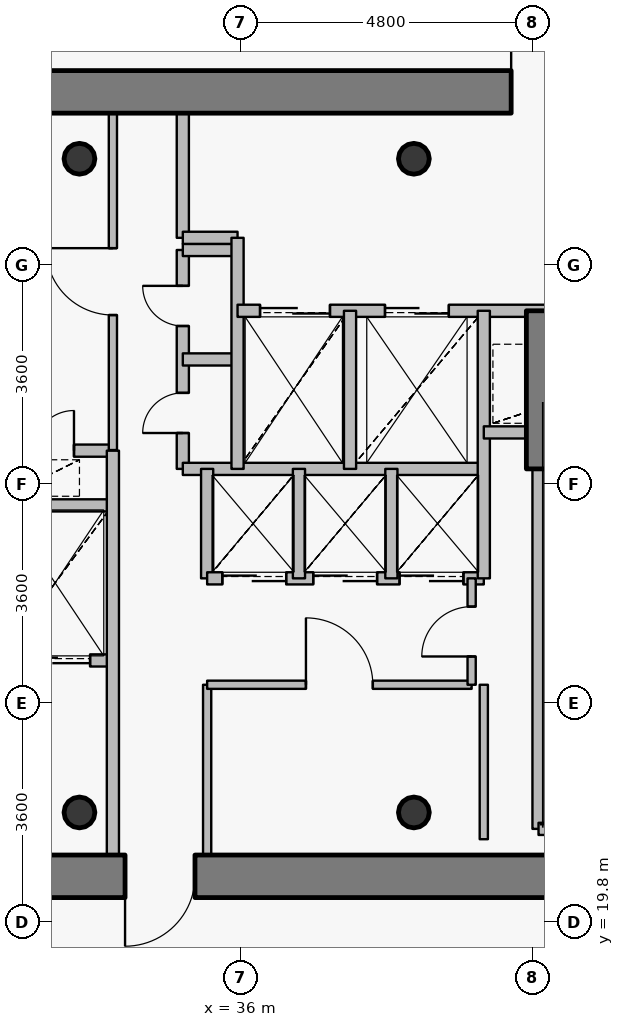
"""IFC4 building model, lengths in metres.
Left out: names, types, materials, properties, quantities, classifications, styles, units other than length and angle.
Written with IfcOpenShell. Run it as: python <this file> out.ifc"""

import sys

from ifc_helpers import new_model, si_unit, direction, frame, frame_2d, origin, origin_2d, place, context, subcontext, project, spatial, rectangle, hollow_circle, extrude, source, transform, mapped, element, fill, save


model = new_model("IFC4")
c1 = context("Model", 3, precision=1e-05, world=origin(), true_north=direction((0.0, 1.0)))
c2 = subcontext(c1, "Body", "Model", "MODEL_VIEW")
j1 = project(units=[si_unit("LENGTHUNIT", "METRE"), si_unit("PLANEANGLEUNIT", "RADIAN")], contexts=[c1])
p1 = place(None, origin())
s1 = spatial("IfcSite", under=j1, at=p1, CompositionType="ELEMENT")
p2 = place(p1, origin())
s2 = spatial("IfcBuilding", under=s1, at=p2, CompositionType="ELEMENT")
p3 = place(p2, frame((0.0, 0.0, 343.0)))
s3 = spatial("IfcBuildingStorey", under=s2, at=p3, CompositionType="ELEMENT", Elevation=343.0)
for number, where, z_axis, x_axis in (
    (1, (33.35, 21.6, 0.0), (0.0, 0.0, 1.0), (1.0, 0.0, 0.0)),
    (2, (38.85, 21.6, 0.0), (0.0, 0.0, 1.0), (1.0, 0.0, 0.0)),
    (3, (38.85, 32.35, 0.0), (0.0, 0.0, 1.0), (1.0, 0.0, 0.0)),
    (4, (33.35, 32.35, 0.0), (0.0, 0.0, 1.0), (1.0, 0.0, 0.0)),
):
    element("IfcColumn", number, at=place(p3, frame(where, z_axis=z_axis, x_axis=x_axis)), inside=s3, PredefinedType="COLUMN", context=c2, shape_type="SweptSolid", body=[
        extrude(hollow_circle(Radius=0.254, WallThickness=0.02, at=origin_2d()), origin(), (0.0, 0.0, 1.0), 3.8),
    ])
p4 = place(p3, frame((27.6, 33.45, 0.0), z_axis=(0.0, 0.0, 1.0), x_axis=(1.0, 0.0, 0.0)))
e5 = element("IfcWall", 5, at=p4, inside=s3, PredefinedType="SHEAR", context=c2, shape_type="SweptSolid", body=[
    extrude(rectangle(XDim=16.8, YDim=0.7, at=frame_2d((8.4, 0.0))), origin(), (0.0, 0.0, 1.0), 3.05),
])
p5 = place(p4, frame((12.85, 0.0, 0.0)))
e6 = element("IfcOpeningElement", 6, at=p5, cuts=e5, PredefinedType="OPENING", context=c2, shape_type="SweptSolid", body=[
    extrude(rectangle(XDim=1.15, YDim=2.15, at=origin_2d()), frame((0.575, 0.36, 1.075), z_axis=(0.0, -1.0, 0.0), x_axis=(1.0, 0.0, 0.0)), (0.0, 0.0, 1.0), 0.72),
])
p6 = place(p3, frame((44.4, 20.55, 0.0), z_axis=(0.0, 0.0, 1.0), x_axis=(-1.0, 0.0, 0.0)))
e7 = element("IfcWall", 7, at=p6, inside=s3, PredefinedType="SHEAR", context=c2, shape_type="SweptSolid", body=[
    extrude(rectangle(XDim=16.8, YDim=0.7, at=frame_2d((8.4, 0.0))), origin(), (0.0, 0.0, 1.0), 3.05),
])
p7 = place(p6, frame((13.0, 0.0, 0.0)))
e8 = element("IfcOpeningElement", 8, at=p7, cuts=e7, PredefinedType="OPENING", context=c2, shape_type="SweptSolid", body=[
    extrude(rectangle(XDim=1.15, YDim=2.15, at=origin_2d()), frame((0.575, 0.36, 1.075), z_axis=(0.0, -1.0, 0.0), x_axis=(1.0, 0.0, 0.0)), (0.0, 0.0, 1.0), 0.72),
])
p8 = place(p6, frame((9.15, 0.0, 0.0)))
e9 = element("IfcOpeningElement", 9, at=p8, cuts=e7, PredefinedType="OPENING", context=c2, shape_type="SweptSolid", body=[
    extrude(rectangle(XDim=1.15, YDim=2.15, at=origin_2d()), frame((0.575, 0.36, 1.075), z_axis=(0.0, -1.0, 0.0), x_axis=(1.0, 0.0, 0.0)), (0.0, 0.0, 1.0), 0.72),
])
p9 = place(p3, frame((40.9, 27.25, 0.0), z_axis=(0.0, 0.0, 1.0), x_axis=(0.0, 1.0, 0.0)))
e10 = element("IfcWall", 10, at=p9, inside=s3, PredefinedType="SHEAR", context=c2, shape_type="SweptSolid", body=[
    extrude(rectangle(XDim=2.6, YDim=0.4, at=frame_2d((1.3, 0.0))), origin(), (0.0, 0.0, 1.0), 3.1),
])
p10 = place(p3, frame((31.1, 27.55, 0.0), z_axis=(0.0, 0.0, 1.0), x_axis=(1.0, 0.0, 0.0)))
e11 = element("IfcWall", 11, at=p10, inside=s3, PredefinedType="PARTITIONING", context=c2, shape_type="SweptSolid", body=[
    extrude(rectangle(XDim=2.8, YDim=0.2, at=frame_2d((1.4, 0.0))), origin(), (0.0, 0.0, 1.0), 3.085),
])
p11 = place(p10, frame((1.5, 0.0, 0.0)))
e12 = element("IfcOpeningElement", 12, at=p11, cuts=e11, PredefinedType="OPENING", context=c2, shape_type="SweptSolid", body=[
    extrude(rectangle(XDim=0.66, YDim=2.05, at=origin_2d()), frame((0.33, 0.11, 1.025), z_axis=(0.0, -1.0, 0.0), x_axis=(1.0, 0.0, 0.0)), (0.0, 0.0, 1.0), 0.22),
])
p12 = place(p3, frame((32.0, 24.1, 0.0), z_axis=(0.0, 0.0, 1.0), x_axis=(1.0, 0.0, 0.0)))
e13 = element("IfcWall", 13, at=p12, inside=s3, PredefinedType="PARTITIONING", context=c2, shape_type="SweptSolid", body=[
    extrude(rectangle(XDim=1.9, YDim=0.2, at=frame_2d((0.95, 0.0))), origin(), (0.0, 0.0, 1.0), 3.085),
])
p13 = place(p12, frame((0.375, 0.0, 0.0)))
e14 = element("IfcOpeningElement", 14, at=p13, cuts=e13, PredefinedType="OPENING", context=c2, shape_type="SweptSolid", body=[
    extrude(rectangle(XDim=1.15, YDim=2.15, at=origin_2d()), frame((0.575, 0.11, 1.075), z_axis=(0.0, -1.0, 0.0), x_axis=(1.0, 0.0, 0.0)), (0.0, 0.0, 1.0), 0.22),
])
p14 = place(p3, frame((32.0, 26.65, 0.0), z_axis=(0.0, 0.0, 1.0), x_axis=(1.0, 0.0, 0.0)))
e15 = element("IfcWall", 15, at=p14, inside=s3, PredefinedType="PARTITIONING", context=c2, shape_type="SweptSolid", body=[
    extrude(rectangle(XDim=1.9, YDim=0.2, at=frame_2d((0.95, 0.0))), origin(), (0.0, 0.0, 1.0), 3.085),
])
p15 = place(p3, frame((33.9, 20.9, 0.0), z_axis=(0.0, 0.0, 1.0), x_axis=(0.0, 1.0, 0.0)))
e16 = element("IfcWall", 16, at=p15, inside=s3, PredefinedType="PARTITIONING", context=c2, shape_type="SweptSolid", body=[
    extrude(rectangle(XDim=6.65, YDim=0.2, at=frame_2d((3.325, 0.0))), origin(), (0.0, 0.0, 1.0), 3.085),
])
p16 = place(p3, frame((33.9, 27.56, 0.0), z_axis=(0.0, 0.0, 1.0), x_axis=(0.0, 1.0, 0.0)))
e17 = element("IfcWall", 17, at=p16, inside=s3, PredefinedType="PARTITIONING", context=c2, shape_type="SweptSolid", body=[
    extrude(rectangle(XDim=5.54, YDim=0.135, at=frame_2d((2.77, 0.0))), origin(), (0.0, 0.0, 1.0), 3.085),
])
p17 = place(p16, frame((2.22, 0.0, 0.0)))
e18 = element("IfcOpeningElement", 18, at=p17, cuts=e17, PredefinedType="OPENING", context=c2, shape_type="SweptSolid", body=[
    extrude(rectangle(XDim=1.1, YDim=2.15, at=origin_2d()), frame((0.55, 0.078, 1.075), z_axis=(0.0, -1.0, 0.0), x_axis=(1.0, 0.0, 0.0)), (0.0, 0.0, 1.0), 0.155),
])
p18 = place(p3, frame((35.05, 27.25, 0.0), z_axis=(0.0, 0.0, 1.0), x_axis=(0.0, 1.0, 0.0)))
e19 = element("IfcWall", 19, at=p18, inside=s3, PredefinedType="PARTITIONING", context=c2, shape_type="SweptSolid", body=[
    extrude(rectangle(XDim=3.6, YDim=0.2, at=frame_2d((1.8, 0.0))), origin(), (0.0, 0.0, 1.0), 3.5),
])
p19 = place(p18, frame((0.59, 0.0, 0.0)))
e20 = element("IfcOpeningElement", 20, at=p19, cuts=e19, PredefinedType="OPENING", context=c2, shape_type="SweptSolid", body=[
    extrude(rectangle(XDim=0.66, YDim=2.05, at=origin_2d()), frame((0.33, 0.11, 1.025), z_axis=(0.0, -1.0, 0.0), x_axis=(1.0, 0.0, 0.0)), (0.0, 0.0, 1.0), 0.22),
])
p20 = place(p18, frame((2.35, 0.0, 0.0)))
e21 = element("IfcOpeningElement", 21, at=p20, cuts=e19, PredefinedType="OPENING", context=c2, shape_type="SweptSolid", body=[
    extrude(rectangle(XDim=0.66, YDim=2.05, at=origin_2d()), frame((0.33, 0.11, 1.025), z_axis=(0.0, -1.0, 0.0), x_axis=(1.0, 0.0, 0.0)), (0.0, 0.0, 1.0), 0.22),
])
p21 = place(p3, frame((35.05, 27.25, 0.0), z_axis=(0.0, 0.0, 1.0), x_axis=(1.0, 0.0, 0.0)))
e22 = element("IfcWall", 22, at=p21, inside=s3, PredefinedType="PARTITIONING", context=c2, shape_type="SweptSolid", body=[
    extrude(rectangle(XDim=4.95, YDim=0.2, at=frame_2d((2.475, 0.0))), origin(), (0.0, 0.0, 1.0), 3.085),
])
for number, where, z_axis, x_axis in (
    (23, (35.05, 29.05, 0.0), (0.0, 0.0, 1.0), (1.0, 0.0, 0.0)),
    (24, (35.05, 30.85, 0.0), (0.0, 0.0, 1.0), (1.0, 0.0, 0.0)),
):
    element("IfcWall", number, at=place(p3, frame(where, z_axis=z_axis, x_axis=x_axis)), inside=s3, PredefinedType="PARTITIONING", context=c2, shape_type="SweptSolid", body=[
        extrude(rectangle(XDim=0.9, YDim=0.2, at=frame_2d((0.45, 0.0))), origin(), (0.0, 0.0, 1.0), 3.5),
    ])
p22 = place(p3, frame((35.05, 31.05, 0.0), z_axis=(0.0, 0.0, 1.0), x_axis=(0.0, 1.0, 0.0)))
e25 = element("IfcWall", 25, at=p22, inside=s3, PredefinedType="PARTITIONING", context=c2, shape_type="SweptSolid", body=[
    extrude(rectangle(XDim=2.05, YDim=0.2, at=frame_2d((1.025, 0.0))), origin(), (0.0, 0.0, 1.0), 3.085),
])
p23 = place(p3, frame((35.05, 31.05, 0.0), z_axis=(0.0, 0.0, 1.0), x_axis=(1.0, 0.0, 0.0)))
e26 = element("IfcWall", 26, at=p23, inside=s3, PredefinedType="PARTITIONING", context=c2, shape_type="SweptSolid", body=[
    extrude(rectangle(XDim=0.9, YDim=0.2, at=frame_2d((0.45, 0.0))), origin(), (0.0, 0.0, 1.0), 3.5),
])
p24 = place(p3, frame((35.45, 20.9, 0.0), z_axis=(0.0, 0.0, 1.0), x_axis=(0.0, 1.0, 0.0)))
e27 = element("IfcWall", 27, at=p24, inside=s3, PredefinedType="PARTITIONING", context=c2, shape_type="SweptSolid", body=[
    extrude(rectangle(XDim=2.8, YDim=0.135, at=frame_2d((1.4, 0.0))), origin(), (0.0, 0.0, 1.0), 3.085),
])
p25 = place(p3, frame((35.45, 23.7, 0.0), z_axis=(0.0, 0.0, 1.0), x_axis=(1.0, 0.0, 0.0)))
e28 = element("IfcWall", 28, at=p25, inside=s3, PredefinedType="PARTITIONING", context=c2, shape_type="SweptSolid", body=[
    extrude(rectangle(XDim=4.35, YDim=0.135, at=frame_2d((2.175, 0.0))), origin(), (0.0, 0.0, 1.0), 3.085),
])
p26 = place(p25, frame((1.625, 0.0, 0.0)))
e29 = element("IfcOpeningElement", 29, at=p26, cuts=e28, PredefinedType="OPENING", context=c2, shape_type="SweptSolid", body=[
    extrude(rectangle(XDim=1.1, YDim=2.15, at=origin_2d()), frame((0.55, 0.078, 1.075), z_axis=(0.0, -1.0, 0.0), x_axis=(1.0, 0.0, 0.0)), (0.0, 0.0, 1.0), 0.155),
])
p27 = place(p3, frame((35.45, 25.45, 0.0), z_axis=(0.0, 0.0, 1.0), x_axis=(0.0, 1.0, 0.0)))
e30 = element("IfcWall", 30, at=p27, inside=s3, PredefinedType="PARTITIONING", context=c2, shape_type="SweptSolid", body=[
    extrude(rectangle(XDim=1.8, YDim=0.2, at=frame_2d((0.9, 0.0))), origin(), (0.0, 0.0, 1.0), 3.5),
])
p28 = place(p3, frame((35.45, 25.45, 0.0), z_axis=(0.0, 0.0, 1.0), x_axis=(1.0, 0.0, 0.0)))
e31 = element("IfcWall", 31, at=p28, inside=s3, PredefinedType="PARTITIONING", context=c2, shape_type="SweptSolid", body=[
    extrude(rectangle(XDim=4.55, YDim=0.2, at=frame_2d((2.275, 0.0))), origin(), (0.0, 0.0, 1.0), 3.085),
])
p29 = place(p28, frame((0.25, 0.0, 0.0)))
e32 = element("IfcOpeningElement", 32, at=p29, cuts=e31, PredefinedType="OPENING", context=c2, shape_type="SweptSolid", body=[
    extrude(rectangle(XDim=1.05, YDim=2.15, at=origin_2d()), frame((0.525, 0.11, 1.075), z_axis=(0.0, -1.0, 0.0), x_axis=(1.0, 0.0, 0.0)), (0.0, 0.0, 1.0), 0.22),
])
p30 = place(p28, frame((1.745, 0.0, 0.0)))
e33 = element("IfcOpeningElement", 33, at=p30, cuts=e31, PredefinedType="OPENING", context=c2, shape_type="SweptSolid", body=[
    extrude(rectangle(XDim=1.05, YDim=2.15, at=origin_2d()), frame((0.525, 0.11, 1.075), z_axis=(0.0, -1.0, 0.0), x_axis=(1.0, 0.0, 0.0)), (0.0, 0.0, 1.0), 0.22),
])
p31 = place(p28, frame((3.165, 0.0, 0.0)))
e34 = element("IfcOpeningElement", 34, at=p31, cuts=e31, PredefinedType="OPENING", context=c2, shape_type="SweptSolid", body=[
    extrude(rectangle(XDim=1.05, YDim=2.15, at=origin_2d()), frame((0.525, 0.11, 1.075), z_axis=(0.0, -1.0, 0.0), x_axis=(1.0, 0.0, 0.0)), (0.0, 0.0, 1.0), 0.22),
])
p32 = place(p3, frame((35.95, 27.25, 0.0), z_axis=(0.0, 0.0, 1.0), x_axis=(0.0, 1.0, 0.0)))
e35 = element("IfcWall", 35, at=p32, inside=s3, PredefinedType="PARTITIONING", context=c2, shape_type="SweptSolid", body=[
    extrude(rectangle(XDim=3.8, YDim=0.2, at=frame_2d((1.9, 0.0))), origin(), (0.0, 0.0, 1.0), 3.5),
])
p33 = place(p3, frame((35.95, 29.85, 0.0), z_axis=(0.0, 0.0, 1.0), x_axis=(1.0, 0.0, 0.0)))
e36 = element("IfcWall", 36, at=p33, inside=s3, PredefinedType="PARTITIONING", context=c2, shape_type="SweptSolid", body=[
    extrude(rectangle(XDim=8.49, YDim=0.2, at=frame_2d((4.245, 0.0))), origin(), (0.0, 0.0, 1.0), 3.085),
])
p34 = place(p33, frame((6.1, 0.0, 0.0)))
e37 = element("IfcOpeningElement", 37, at=p34, cuts=e36, PredefinedType="OPENING", context=c2, shape_type="SweptSolid", body=[
    extrude(rectangle(XDim=1.2, YDim=2.15, at=origin_2d()), frame((0.6, 0.11, 1.075), z_axis=(0.0, -1.0, 0.0), x_axis=(1.0, 0.0, 0.0)), (0.0, 0.0, 1.0), 0.22),
])
p35 = place(p33, frame((0.37, 0.0, 0.0)))
e38 = element("IfcOpeningElement", 38, at=p35, cuts=e36, PredefinedType="OPENING", context=c2, shape_type="SweptSolid", body=[
    extrude(rectangle(XDim=1.15, YDim=2.15, at=origin_2d()), frame((0.575, 0.11, 1.075), z_axis=(0.0, -1.0, 0.0), x_axis=(1.0, 0.0, 0.0)), (0.0, 0.0, 1.0), 0.22),
])
p36 = place(p33, frame((2.425, 0.0, 0.0)))
e39 = element("IfcOpeningElement", 39, at=p36, cuts=e36, PredefinedType="OPENING", context=c2, shape_type="SweptSolid", body=[
    extrude(rectangle(XDim=1.05, YDim=2.15, at=origin_2d()), frame((0.525, 0.11, 1.075), z_axis=(0.0, -1.0, 0.0), x_axis=(1.0, 0.0, 0.0)), (0.0, 0.0, 1.0), 0.22),
])
p37 = place(p3, frame((36.96, 25.45, 0.0), z_axis=(0.0, 0.0, 1.0), x_axis=(0.0, 1.0, 0.0)))
e40 = element("IfcWall", 40, at=p37, inside=s3, PredefinedType="PARTITIONING", context=c2, shape_type="SweptSolid", body=[
    extrude(rectangle(XDim=1.8, YDim=0.2, at=frame_2d((0.9, 0.0))), origin(), (0.0, 0.0, 1.0), 3.5),
])
p38 = place(p3, frame((37.8, 27.25, 0.0), z_axis=(0.0, 0.0, 1.0), x_axis=(0.0, 1.0, 0.0)))
e41 = element("IfcWall", 41, at=p38, inside=s3, PredefinedType="PARTITIONING", context=c2, shape_type="SweptSolid", body=[
    extrude(rectangle(XDim=2.6, YDim=0.2, at=frame_2d((1.3, 0.0))), origin(), (0.0, 0.0, 1.0), 3.5),
])
p39 = place(p3, frame((38.48, 25.45, 0.0), z_axis=(0.0, 0.0, 1.0), x_axis=(0.0, 1.0, 0.0)))
e42 = element("IfcWall", 42, at=p39, inside=s3, PredefinedType="PARTITIONING", context=c2, shape_type="SweptSolid", body=[
    extrude(rectangle(XDim=1.8, YDim=0.2, at=frame_2d((0.9, 0.0))), origin(), (0.0, 0.0, 1.0), 3.5),
])
p40 = place(p3, frame((39.8, 23.7, 0.0), z_axis=(0.0, 0.0, 1.0), x_axis=(0.0, 1.0, 0.0)))
e43 = element("IfcWall", 43, at=p40, inside=s3, PredefinedType="PARTITIONING", context=c2, shape_type="SweptSolid", body=[
    extrude(rectangle(XDim=1.75, YDim=0.135, at=frame_2d((0.875, 0.0))), origin(), (0.0, 0.0, 1.0), 3.5),
])
p41 = place(p40, frame((0.465, 0.0, 0.0)))
e44 = element("IfcOpeningElement", 44, at=p41, cuts=e43, PredefinedType="OPENING", context=c2, shape_type="SweptSolid", body=[
    extrude(rectangle(XDim=0.82, YDim=2.1, at=origin_2d()), frame((0.41, 0.078, 1.05), z_axis=(0.0, -1.0, 0.0), x_axis=(1.0, 0.0, 0.0)), (0.0, 0.0, 1.0), 0.155),
])
p42 = place(p3, frame((40.0, 25.45, 0.0), z_axis=(0.0, 0.0, 1.0), x_axis=(0.0, 1.0, 0.0)))
e45 = element("IfcWall", 45, at=p42, inside=s3, PredefinedType="PARTITIONING", context=c2, shape_type="SweptSolid", body=[
    extrude(rectangle(XDim=4.4, YDim=0.2, at=frame_2d((2.2, 0.0))), origin(), (0.0, 0.0, 1.0), 3.5),
])
p43 = place(p3, frame((40.0, 27.85, 0.0), z_axis=(0.0, 0.0, 1.0), x_axis=(1.0, 0.0, 0.0)))
e46 = element("IfcWall", 46, at=p43, inside=s3, PredefinedType="PARTITIONING", context=c2, shape_type="SweptSolid", body=[
    extrude(rectangle(XDim=0.9, YDim=0.2, at=frame_2d((0.45, 0.0))), origin(), (0.0, 0.0, 1.0), 3.5),
])
p44 = place(p3, frame((40.9, 21.33, 0.0), z_axis=(0.0, 0.0, 1.0), x_axis=(0.0, 1.0, 0.0)))
e47 = element("IfcWall", 47, at=p44, inside=s3, PredefinedType="PARTITIONING", context=c2, shape_type="SweptSolid", body=[
    extrude(rectangle(XDim=5.91, YDim=0.2, at=frame_2d((2.955, 0.0))), origin(), (0.0, 0.0, 1.0), 3.035),
])
p45 = place(p3, frame((40.9, 21.33, 0.0), z_axis=(0.0, 0.0, 1.0), x_axis=(1.0, 0.0, 0.0)))
e48 = element("IfcWall", 48, at=p45, inside=s3, PredefinedType="PARTITIONING", context=c2, shape_type="SweptSolid", body=[
    extrude(rectangle(XDim=0.25, YDim=0.2, at=frame_2d((0.125, 0.0))), origin(), (0.0, 0.0, 1.0), 3.035),
])
p46 = place(p3, frame((40.0, 23.7, 0.0), z_axis=(0.0, 0.0, 1.0), x_axis=(0.0, -1.0, 0.0)))
e49 = element("IfcWall", 49, at=p46, inside=s3, PredefinedType="PARTITIONING", context=c2, shape_type="SweptSolid", body=[
    extrude(rectangle(XDim=2.54, YDim=0.135, at=frame_2d((1.27, 0.0))), origin(), (0.0, 0.0, 1.0), 3.035),
])
m1 = source(origin(), c2, "Body", "SweptSolid", [
    extrude(rectangle(XDim=1.15, YDim=2.15, at=origin_2d()), frame((0.575, 0.025, 1.075), z_axis=(0.0, -1.0, 0.0), x_axis=(1.0, 0.0, 0.0)), (0.0, 0.0, 1.0), 0.05),
])
p47 = place(p5, origin())
e50 = element("IfcDoor", 50, at=p47, inside=s3, OperationType="SINGLE_SWING_LEFT", PredefinedType="DOOR", context=c2, shape_type="MappedRepresentation", body=[
    mapped(m1, transform((0.0, 0.0, 0.0), x_axis=(1.0, 0.0, 0.0), y_axis=(0.0, 1.0, 0.0), z_axis=(0.0, 0.0, 1.0), scale=1.0)),
])
fill(e6, e50)
p48 = place(p8, origin())
e51 = element("IfcDoor", 51, at=p48, inside=s3, OperationType="SINGLE_SWING_RIGHT", PredefinedType="DOOR", context=c2, shape_type="MappedRepresentation", body=[
    mapped(m1, transform((0.0, 0.0, 0.0), x_axis=(1.0, 0.0, 0.0), y_axis=(0.0, 1.0, 0.0), z_axis=(0.0, 0.0, 1.0), scale=1.0)),
])
fill(e9, e51)
m2 = source(origin(), c2, "Body", "SweptSolid", [
    extrude(rectangle(XDim=1.15, YDim=2.15, at=origin_2d()), frame((0.575, 0.025, 1.075), z_axis=(0.0, -1.0, 0.0), x_axis=(1.0, 0.0, 0.0)), (0.0, 0.0, 1.0), 0.05),
])
p49 = place(p35, origin())
e52 = element("IfcDoor", 52, at=p49, inside=s3, OperationType="DOUBLE_DOOR_SLIDING", PredefinedType="USERDEFINED", context=c2, shape_type="MappedRepresentation", body=[
    mapped(m2, transform((0.0, 0.0, 0.0), x_axis=(1.0, 0.0, 0.0), y_axis=(0.0, 1.0, 0.0), z_axis=(0.0, 0.0, 1.0), scale=1.0)),
])
fill(e38, e52)
p50 = place(p13, origin())
e53 = element("IfcDoor", 53, at=p50, inside=s3, OperationType="DOUBLE_DOOR_SLIDING", PredefinedType="USERDEFINED", context=c2, shape_type="MappedRepresentation", body=[
    mapped(m2, transform((0.0, 0.0, 0.0), x_axis=(1.0, 0.0, 0.0), y_axis=(0.0, 1.0, 0.0), z_axis=(0.0, 0.0, 1.0), scale=1.0)),
])
fill(e14, e53)
m3 = source(origin(), c2, "Body", "SweptSolid", [
    extrude(rectangle(XDim=1.05, YDim=2.15, at=origin_2d()), frame((0.525, 0.025, 1.075), z_axis=(0.0, -1.0, 0.0), x_axis=(1.0, 0.0, 0.0)), (0.0, 0.0, 1.0), 0.05),
])
p51 = place(p36, origin())
e54 = element("IfcDoor", 54, at=p51, inside=s3, OperationType="DOUBLE_DOOR_SLIDING", PredefinedType="USERDEFINED", context=c2, shape_type="MappedRepresentation", body=[
    mapped(m3, transform((0.0, 0.0, 0.0), x_axis=(1.0, 0.0, 0.0), y_axis=(0.0, 1.0, 0.0), z_axis=(0.0, 0.0, 1.0), scale=1.0)),
])
fill(e39, e54)
p52 = place(p29, origin())
e55 = element("IfcDoor", 55, at=p52, inside=s3, OperationType="DOUBLE_DOOR_SLIDING", PredefinedType="USERDEFINED", context=c2, shape_type="MappedRepresentation", body=[
    mapped(m3, transform((0.0, 0.0, 0.0), x_axis=(1.0, 0.0, 0.0), y_axis=(0.0, 1.0, 0.0), z_axis=(0.0, 0.0, 1.0), scale=1.0)),
])
fill(e32, e55)
p53 = place(p30, origin())
e56 = element("IfcDoor", 56, at=p53, inside=s3, OperationType="DOUBLE_DOOR_SLIDING", PredefinedType="USERDEFINED", context=c2, shape_type="MappedRepresentation", body=[
    mapped(m3, transform((0.0, 0.0, 0.0), x_axis=(1.0, 0.0, 0.0), y_axis=(0.0, 1.0, 0.0), z_axis=(0.0, 0.0, 1.0), scale=1.0)),
])
fill(e33, e56)
p54 = place(p31, origin())
e57 = element("IfcDoor", 57, at=p54, inside=s3, OperationType="DOUBLE_DOOR_SLIDING", PredefinedType="USERDEFINED", context=c2, shape_type="MappedRepresentation", body=[
    mapped(m3, transform((0.0, 0.0, 0.0), x_axis=(1.0, 0.0, 0.0), y_axis=(0.0, 1.0, 0.0), z_axis=(0.0, 0.0, 1.0), scale=1.0)),
])
fill(e34, e57)
m4 = source(origin(), c2, "Body", "SweptSolid", [
    extrude(rectangle(XDim=0.66, YDim=2.05, at=origin_2d()), frame((0.33, 0.025, 1.025), z_axis=(0.0, -1.0, 0.0), x_axis=(1.0, 0.0, 0.0)), (0.0, 0.0, 1.0), 0.05),
])
p55 = place(p19, origin())
e58 = element("IfcDoor", 58, at=p55, inside=s3, OperationType="SINGLE_SWING_LEFT", PredefinedType="USERDEFINED", context=c2, shape_type="MappedRepresentation", body=[
    mapped(m4, transform((0.0, 0.0, 0.0), x_axis=(1.0, 0.0, 0.0), y_axis=(0.0, 1.0, 0.0), z_axis=(0.0, 0.0, 1.0), scale=1.0)),
])
fill(e20, e58)
p56 = place(p20, origin())
e59 = element("IfcDoor", 59, at=p56, inside=s3, OperationType="SINGLE_SWING_RIGHT", PredefinedType="USERDEFINED", context=c2, shape_type="MappedRepresentation", body=[
    mapped(m4, transform((0.0, 0.0, 0.0), x_axis=(1.0, 0.0, 0.0), y_axis=(0.0, 1.0, 0.0), z_axis=(0.0, 0.0, 1.0), scale=1.0)),
])
fill(e21, e59)
m5 = source(origin(), c2, "Body", "SweptSolid", [
    extrude(rectangle(XDim=1.1, YDim=2.15, at=origin_2d()), frame((0.55, 0.025, 1.075), z_axis=(0.0, -1.0, 0.0), x_axis=(1.0, 0.0, 0.0)), (0.0, 0.0, 1.0), 0.05),
])
p57 = place(p26, origin())
e60 = element("IfcDoor", 60, at=p57, inside=s3, OperationType="SINGLE_SWING_LEFT", PredefinedType="DOOR", context=c2, shape_type="MappedRepresentation", body=[
    mapped(m5, transform((0.0, 0.0, 0.0), x_axis=(1.0, 0.0, 0.0), y_axis=(0.0, 1.0, 0.0), z_axis=(0.0, 0.0, 1.0), scale=1.0)),
])
fill(e29, e60)
p58 = place(p17, origin())
e61 = element("IfcDoor", 61, at=p58, inside=s3, OperationType="SINGLE_SWING_RIGHT", PredefinedType="DOOR", context=c2, shape_type="MappedRepresentation", body=[
    mapped(m5, transform((0.0, 0.0, 0.0), x_axis=(1.0, 0.0, 0.0), y_axis=(0.0, 1.0, 0.0), z_axis=(0.0, 0.0, 1.0), scale=1.0)),
])
fill(e18, e61)
m6 = source(origin(), c2, "Body", "SweptSolid", [
    extrude(rectangle(XDim=0.82, YDim=2.1, at=origin_2d()), frame((0.41, 0.025, 1.05), z_axis=(0.0, -1.0, 0.0), x_axis=(1.0, 0.0, 0.0)), (0.0, 0.0, 1.0), 0.05),
])
p59 = place(p41, origin())
e62 = element("IfcDoor", 62, at=p59, inside=s3, OperationType="SINGLE_SWING_LEFT", PredefinedType="DOOR", context=c2, shape_type="MappedRepresentation", body=[
    mapped(m6, transform((0.0, 0.0, 0.0), x_axis=(1.0, 0.0, 0.0), y_axis=(0.0, 1.0, 0.0), z_axis=(0.0, 0.0, 1.0), scale=1.0)),
])
fill(e44, e62)
p60 = place(p11, origin())
e63 = element("IfcDoor", 63, at=p60, inside=s3, OperationType="SINGLE_SWING_RIGHT", PredefinedType="USERDEFINED", context=c2, shape_type="MappedRepresentation", body=[
    mapped(m4, transform((0.0, 0.0, 0.0), x_axis=(1.0, 0.0, 0.0), y_axis=(0.0, 1.0, 0.0), z_axis=(0.0, 0.0, 1.0), scale=1.0)),
])
fill(e12, e63)
save(model, sys.argv[1])
